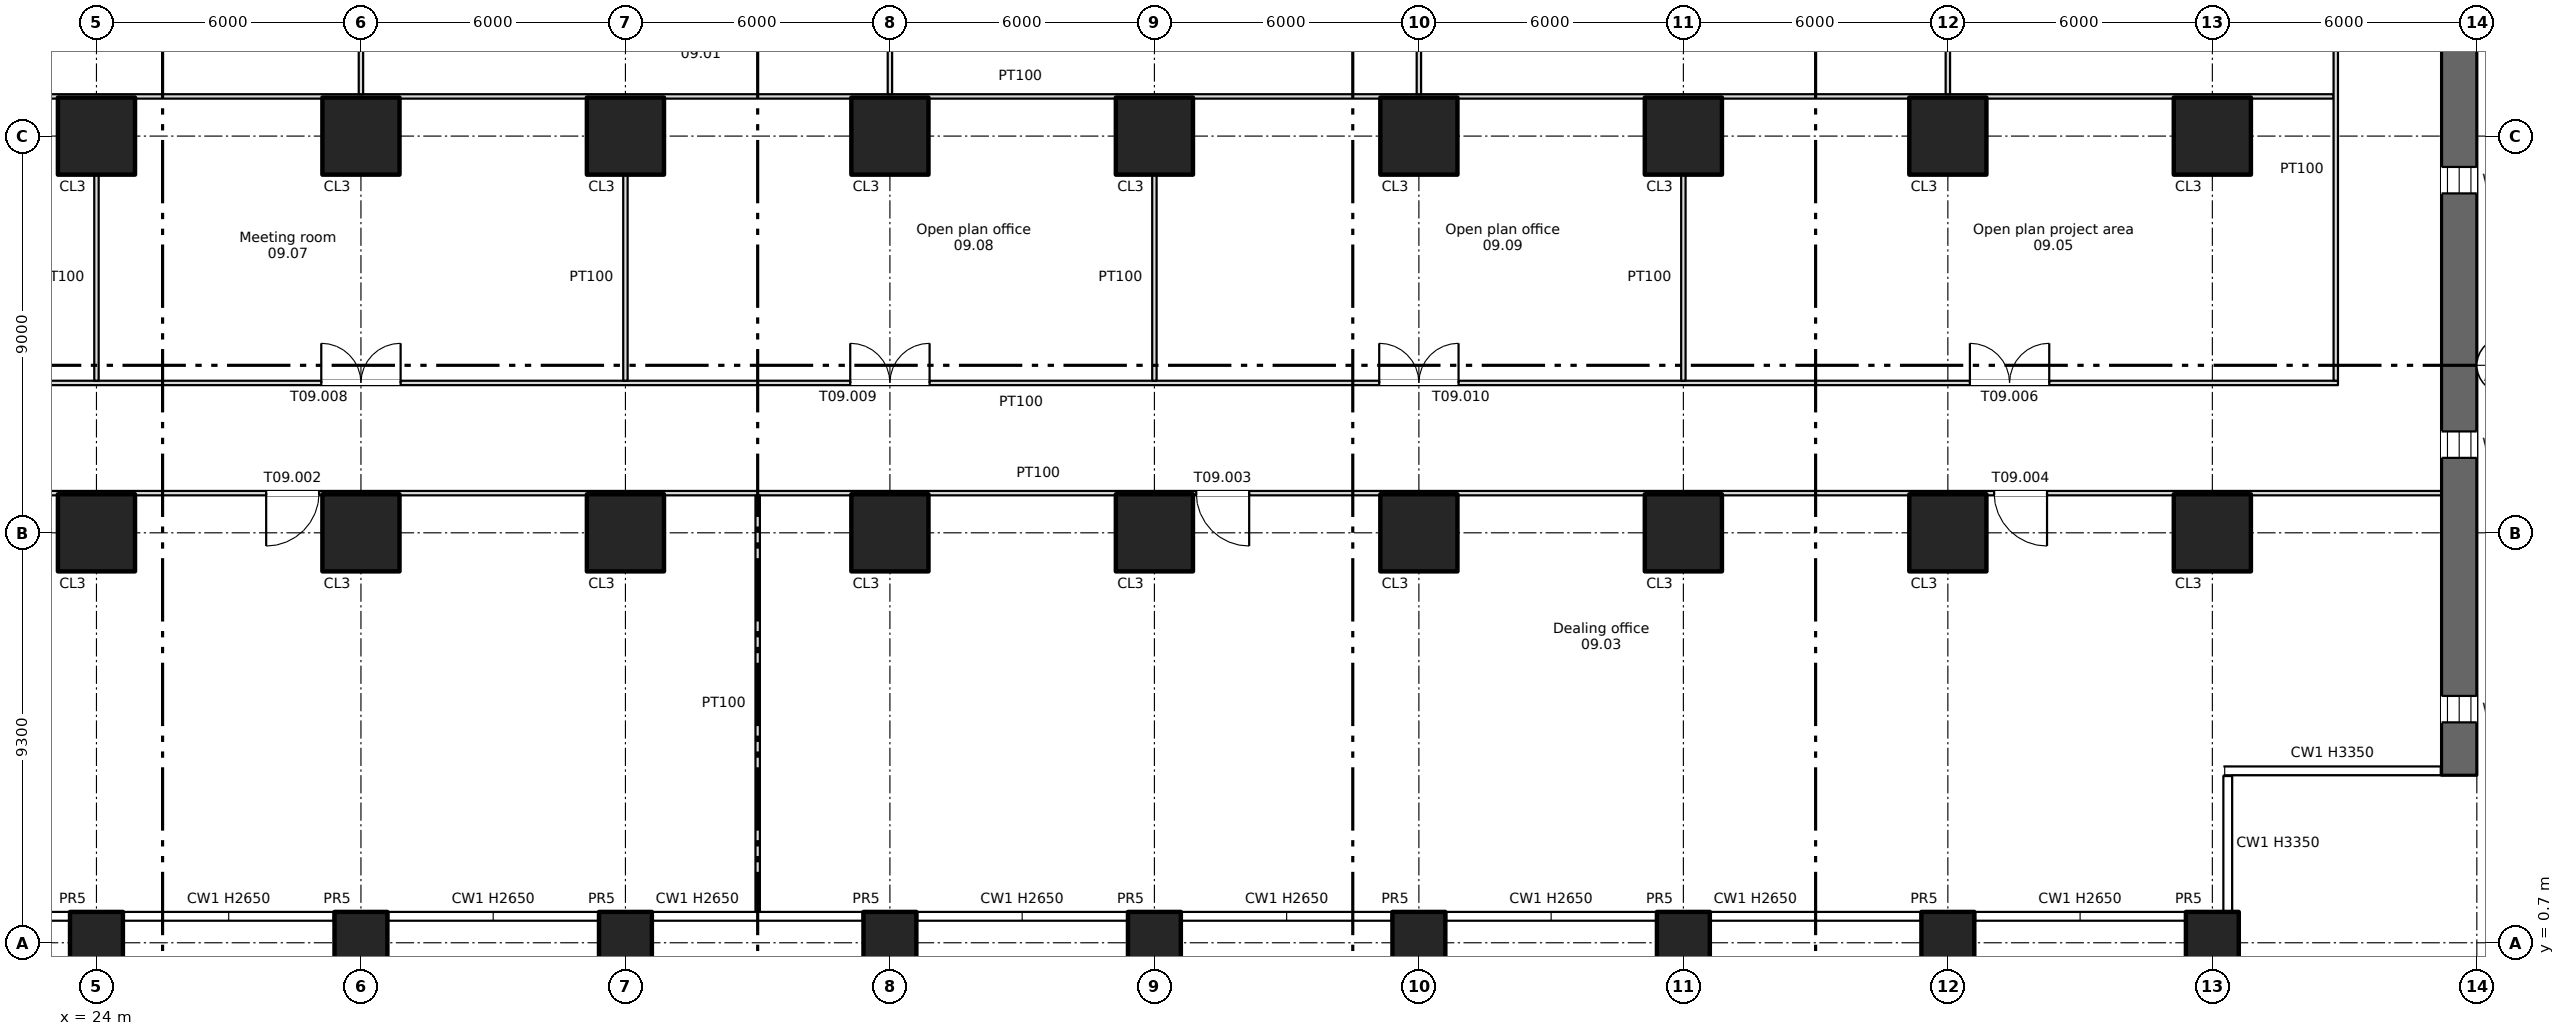
"""IFC4 building model, lengths in metres.
Left out: names, types, materials, properties, quantities, classifications, styles, units other than length and angle.
Written with IfcOpenShell. Run it as: python <this file> out.ifc"""

import sys

from ifc_helpers import new_model, si_unit, direction, frame, frame_2d, origin, origin_2d, place, context, subcontext, project, spatial, rectangle, extrude, element, fill, save


model = new_model("IFC4")
c1 = context("Model", 3, precision=1e-05, world=origin(), true_north=direction((0.0, 1.0)))
c2 = subcontext(c1, "Body", "Model", "MODEL_VIEW")
j1 = project(units=[si_unit("LENGTHUNIT", "METRE"), si_unit("PLANEANGLEUNIT", "RADIAN")], contexts=[c1])
p1 = place(None, origin())
s1 = spatial("IfcSite", under=j1, at=p1, CompositionType="ELEMENT")
p2 = place(p1, origin())
s2 = spatial("IfcBuilding", under=s1, at=p2, CompositionType="ELEMENT")
p3 = place(p2, frame((0.0, 0.0, 37.5)))
s3 = spatial("IfcBuildingStorey", under=s2, at=p3, CompositionType="ELEMENT", Elevation=37.5)
for number, where, z_axis, x_axis in (
    (1, (24.0, 0.7, -0.4), (0.0, 0.0, 1.0), (1.0, 0.0, 0.0)),
    (2, (30.0, 0.7, -0.4), (0.0, 0.0, 1.0), (1.0, 0.0, 0.0)),
    (3, (36.0, 0.7, -0.4), (0.0, 0.0, 1.0), (1.0, 0.0, 0.0)),
    (4, (42.0, 0.7, -0.4), (0.0, 0.0, 1.0), (1.0, 0.0, 0.0)),
    (5, (48.0, 0.7, -0.4), (0.0, 0.0, 1.0), (1.0, 0.0, 0.0)),
    (6, (54.0, 0.7, -0.4), (0.0, 0.0, 1.0), (1.0, 0.0, 0.0)),
    (7, (60.0, 0.7, -0.4), (0.0, 0.0, 1.0), (1.0, 0.0, 0.0)),
    (8, (66.0, 0.7, -0.4), (0.0, 0.0, 1.0), (1.0, 0.0, 0.0)),
    (9, (72.0, 0.7, -0.4), (0.0, 0.0, 1.0), (1.0, 0.0, 0.0)),
):
    element("IfcColumn", number, at=place(p3, frame(where, z_axis=z_axis, x_axis=x_axis)), inside=s3, PredefinedType="COLUMN", context=c2, shape_type="SweptSolid", body=[
        extrude(rectangle(XDim=1.2, YDim=1.4, at=origin_2d()), origin(), (0.0, 0.0, 1.0), 3.75),
    ])
for number, where, z_axis, x_axis in (
    (10, (24.0, 10.0, 0.0), (0.0, 0.0, 1.0), (1.0, 0.0, 0.0)),
    (11, (24.0, 19.0, 0.0), (0.0, 0.0, 1.0), (1.0, 0.0, 0.0)),
    (12, (30.0, 10.0, 0.0), (0.0, 0.0, 1.0), (1.0, 0.0, 0.0)),
    (13, (30.0, 19.0, 0.0), (0.0, 0.0, 1.0), (1.0, 0.0, 0.0)),
    (14, (36.0, 10.0, 0.0), (0.0, 0.0, 1.0), (1.0, 0.0, 0.0)),
    (15, (36.0, 19.0, 0.0), (0.0, 0.0, 1.0), (1.0, 0.0, 0.0)),
    (16, (42.0, 10.0, 0.0), (0.0, 0.0, 1.0), (1.0, 0.0, 0.0)),
    (17, (42.0, 19.0, 0.0), (0.0, 0.0, 1.0), (1.0, 0.0, 0.0)),
    (18, (48.0, 10.0, 0.0), (0.0, 0.0, 1.0), (1.0, 0.0, 0.0)),
    (19, (48.0, 19.0, 0.0), (0.0, 0.0, 1.0), (1.0, 0.0, 0.0)),
    (20, (54.0, 10.0, 0.0), (0.0, 0.0, 1.0), (1.0, 0.0, 0.0)),
    (21, (54.0, 19.0, 0.0), (0.0, 0.0, 1.0), (1.0, 0.0, 0.0)),
    (22, (60.0, 10.0, 0.0), (0.0, 0.0, 1.0), (1.0, 0.0, 0.0)),
    (23, (60.0, 19.0, 0.0), (0.0, 0.0, 1.0), (1.0, 0.0, 0.0)),
    (24, (66.0, 10.0, 0.0), (0.0, 0.0, 1.0), (1.0, 0.0, 0.0)),
    (25, (66.0, 19.0, 0.0), (0.0, 0.0, 1.0), (1.0, 0.0, 0.0)),
    (26, (72.0, 10.0, 0.0), (0.0, 0.0, 1.0), (1.0, 0.0, 0.0)),
    (27, (72.0, 19.0, 0.0), (0.0, 0.0, 1.0), (1.0, 0.0, 0.0)),
):
    element("IfcColumn", number, at=place(p3, frame(where, z_axis=z_axis, x_axis=x_axis)), inside=s3, PredefinedType="COLUMN", context=c2, shape_type="SweptSolid", body=[
        extrude(rectangle(XDim=1.75, YDim=1.75, at=origin_2d()), origin(), (0.0, 0.0, 1.0), 3.35),
    ])
p4 = place(p3, frame((77.6, 4.5, 0.0), z_axis=(0.0, 0.0, 1.0), x_axis=(0.0, 1.0, 0.0)))
e28 = element("IfcWall", 28, at=p4, inside=s3, PredefinedType="SHEAR", context=c2, shape_type="SweptSolid", body=[
    extrude(rectangle(XDim=37.0, YDim=0.8, at=frame_2d((18.5, 0.0))), origin(), (0.0, 0.0, 1.0), 3.35),
])
p5 = place(p4, frame((1.2, 0.0, 0.6)))
e29 = element("IfcOpeningElement", 29, at=p5, cuts=e28, PredefinedType="OPENING", context=c2, shape_type="SweptSolid", body=[
    extrude(rectangle(XDim=0.6, YDim=2.4, at=frame_2d((0.3, 1.2))), frame((0.0, 0.41, 0.0), z_axis=(0.0, -1.0, 0.0), x_axis=(1.0, 0.0, 0.0)), (0.0, 0.0, 1.0), 0.82),
])
p6 = place(p4, frame((7.2, 0.0, 0.6)))
e30 = element("IfcOpeningElement", 30, at=p6, cuts=e28, PredefinedType="OPENING", context=c2, shape_type="SweptSolid", body=[
    extrude(rectangle(XDim=0.6, YDim=2.4, at=frame_2d((0.3, 1.2))), frame((0.0, 0.41, 0.0), z_axis=(0.0, -1.0, 0.0), x_axis=(1.0, 0.0, 0.0)), (0.0, 0.0, 1.0), 0.82),
])
p7 = place(p4, frame((13.2, 0.0, 0.6)))
e31 = element("IfcOpeningElement", 31, at=p7, cuts=e28, PredefinedType="OPENING", context=c2, shape_type="SweptSolid", body=[
    extrude(rectangle(XDim=0.6, YDim=2.4, at=frame_2d((0.3, 1.2))), frame((0.0, 0.41, 0.0), z_axis=(0.0, -1.0, 0.0), x_axis=(1.0, 0.0, 0.0)), (0.0, 0.0, 1.0), 0.82),
])
p8 = place(p4, frame((19.2, 0.0, 0.6)))
e32 = element("IfcOpeningElement", 32, at=p8, cuts=e28, PredefinedType="OPENING", context=c2, shape_type="SweptSolid", body=[
    extrude(rectangle(XDim=0.6, YDim=2.4, at=frame_2d((0.3, 1.2))), frame((0.0, 0.41, 0.0), z_axis=(0.0, -1.0, 0.0), x_axis=(1.0, 0.0, 0.0)), (0.0, 0.0, 1.0), 0.82),
])
p9 = place(p4, frame((25.2, 0.0, 0.6)))
e33 = element("IfcOpeningElement", 33, at=p9, cuts=e28, PredefinedType="OPENING", context=c2, shape_type="SweptSolid", body=[
    extrude(rectangle(XDim=0.6, YDim=2.4, at=frame_2d((0.3, 1.2))), frame((0.0, 0.41, 0.0), z_axis=(0.0, -1.0, 0.0), x_axis=(1.0, 0.0, 0.0)), (0.0, 0.0, 1.0), 0.82),
])
p10 = place(p4, frame((31.2, 0.0, 0.6)))
e34 = element("IfcOpeningElement", 34, at=p10, cuts=e28, PredefinedType="OPENING", context=c2, shape_type="SweptSolid", body=[
    extrude(rectangle(XDim=0.6, YDim=2.4, at=frame_2d((0.3, 1.2))), frame((0.0, 0.41, 0.0), z_axis=(0.0, -1.0, 0.0), x_axis=(1.0, 0.0, 0.0)), (0.0, 0.0, 1.0), 0.82),
])
p11 = place(p3, frame((0.8, 10.9, 0.0), z_axis=(0.0, 0.0, 1.0), x_axis=(1.0, 0.0, 0.0)))
e35 = element("IfcWall", 35, at=p11, inside=s3, PredefinedType="PARTITIONING", context=c2, shape_type="SweptSolid", body=[
    extrude(rectangle(XDim=76.4, YDim=0.1, at=frame_2d((38.2, 0.0))), origin(), (0.0, 0.0, 1.0), 3.35),
])
p12 = place(p11, frame((8.95, 0.0, 0.0)))
e36 = element("IfcOpeningElement", 36, at=p12, cuts=e35, PredefinedType="OPENING", context=c2, shape_type="SweptSolid", body=[
    extrude(rectangle(XDim=1.2, YDim=2.1, at=frame_2d((0.6, 1.05))), frame((0.0, 0.06, 0.0), z_axis=(0.0, -1.0, 0.0), x_axis=(1.0, 0.0, 0.0)), (0.0, 0.0, 1.0), 0.12),
])
p13 = place(p11, frame((27.05, 0.0, 0.0)))
e37 = element("IfcOpeningElement", 37, at=p13, cuts=e35, PredefinedType="OPENING", context=c2, shape_type="SweptSolid", body=[
    extrude(rectangle(XDim=1.2, YDim=2.1, at=frame_2d((0.6, 1.05))), frame((0.0, 0.06, 0.0), z_axis=(0.0, -1.0, 0.0), x_axis=(1.0, 0.0, 0.0)), (0.0, 0.0, 1.0), 0.12),
])
p14 = place(p11, frame((48.15, 0.0, 0.0)))
e38 = element("IfcOpeningElement", 38, at=p14, cuts=e35, PredefinedType="OPENING", context=c2, shape_type="SweptSolid", body=[
    extrude(rectangle(XDim=1.2, YDim=2.1, at=frame_2d((0.6, 1.05))), frame((0.0, 0.06, 0.0), z_axis=(0.0, -1.0, 0.0), x_axis=(1.0, 0.0, 0.0)), (0.0, 0.0, 1.0), 0.12),
])
p15 = place(p11, frame((66.25, 0.0, 0.0)))
e39 = element("IfcOpeningElement", 39, at=p15, cuts=e35, PredefinedType="OPENING", context=c2, shape_type="SweptSolid", body=[
    extrude(rectangle(XDim=1.2, YDim=2.1, at=frame_2d((0.6, 1.05))), frame((0.0, 0.06, 0.0), z_axis=(0.0, -1.0, 0.0), x_axis=(1.0, 0.0, 0.0)), (0.0, 0.0, 1.0), 0.12),
])
p16 = place(p3, frame((3.15, 13.4, 0.0), z_axis=(0.0, 0.0, 1.0), x_axis=(1.0, 0.0, 0.0)))
e40 = element("IfcWall", 40, at=p16, inside=s3, PredefinedType="PARTITIONING", context=c2, shape_type="SweptSolid", body=[
    extrude(rectangle(XDim=71.7, YDim=0.1, at=frame_2d((35.85, 0.0))), origin(), (0.0, 0.0, 1.0), 3.35),
])
p17 = place(p16, frame((3.95, 0.0, 0.0)))
e41 = element("IfcOpeningElement", 41, at=p17, cuts=e40, PredefinedType="OPENING", context=c2, shape_type="SweptSolid", body=[
    extrude(rectangle(XDim=1.0, YDim=2.1, at=frame_2d((0.5, 1.05))), frame((0.0, 0.06, 0.0), z_axis=(0.0, -1.0, 0.0), x_axis=(1.0, 0.0, 0.0)), (0.0, 0.0, 1.0), 0.12),
])
p18 = place(p16, frame((63.35, 0.0, 0.0)))
e42 = element("IfcOpeningElement", 42, at=p18, cuts=e40, PredefinedType="OPENING", context=c2, shape_type="SweptSolid", body=[
    extrude(rectangle(XDim=1.8, YDim=2.1, at=frame_2d((0.9, 1.05))), frame((0.0, 0.06, 0.0), z_axis=(0.0, -1.0, 0.0), x_axis=(1.0, 0.0, 0.0)), (0.0, 0.0, 1.0), 0.12),
])
p19 = place(p16, frame((13.95, 0.0, 0.0)))
e43 = element("IfcOpeningElement", 43, at=p19, cuts=e40, PredefinedType="OPENING", context=c2, shape_type="SweptSolid", body=[
    extrude(rectangle(XDim=1.8, YDim=2.1, at=frame_2d((0.9, 1.05))), frame((0.0, 0.06, 0.0), z_axis=(0.0, -1.0, 0.0), x_axis=(1.0, 0.0, 0.0)), (0.0, 0.0, 1.0), 0.12),
])
p20 = place(p16, frame((25.95, 0.0, 0.0)))
e44 = element("IfcOpeningElement", 44, at=p20, cuts=e40, PredefinedType="OPENING", context=c2, shape_type="SweptSolid", body=[
    extrude(rectangle(XDim=1.8, YDim=2.1, at=frame_2d((0.9, 1.05))), frame((0.0, 0.06, 0.0), z_axis=(0.0, -1.0, 0.0), x_axis=(1.0, 0.0, 0.0)), (0.0, 0.0, 1.0), 0.12),
])
p21 = place(p16, frame((37.95, 0.0, 0.0)))
e45 = element("IfcOpeningElement", 45, at=p21, cuts=e40, PredefinedType="OPENING", context=c2, shape_type="SweptSolid", body=[
    extrude(rectangle(XDim=1.8, YDim=2.1, at=frame_2d((0.9, 1.05))), frame((0.0, 0.06, 0.0), z_axis=(0.0, -1.0, 0.0), x_axis=(1.0, 0.0, 0.0)), (0.0, 0.0, 1.0), 0.12),
])
p22 = place(p16, frame((49.95, 0.0, 0.0)))
e46 = element("IfcOpeningElement", 46, at=p22, cuts=e40, PredefinedType="OPENING", context=c2, shape_type="SweptSolid", body=[
    extrude(rectangle(XDim=1.8, YDim=2.1, at=frame_2d((0.9, 1.05))), frame((0.0, 0.06, 0.0), z_axis=(0.0, -1.0, 0.0), x_axis=(1.0, 0.0, 0.0)), (0.0, 0.0, 1.0), 0.12),
])
p23 = place(p3, frame((3.25, 19.9, 0.0), z_axis=(0.0, 0.0, 1.0), x_axis=(1.0, 0.0, 0.0)))
e47 = element("IfcWall", 47, at=p23, inside=s3, PredefinedType="PARTITIONING", context=c2, shape_type="SweptSolid", body=[
    extrude(rectangle(XDim=71.5, YDim=0.1, at=frame_2d((35.75, 0.0))), origin(), (0.0, 0.0, 1.0), 3.35),
])
p24 = place(p3, frame((24.0, 13.45, 0.0), z_axis=(0.0, 0.0, 1.0), x_axis=(0.0, 1.0, 0.0)))
e48 = element("IfcWall", 48, at=p24, inside=s3, PredefinedType="PARTITIONING", context=c2, shape_type="SweptSolid", body=[
    extrude(rectangle(XDim=4.675, YDim=0.1, at=frame_2d((2.337, 0.0))), origin(), (0.0, 0.0, 1.0), 3.35),
])
p25 = place(p3, frame((30.0, 19.95, 0.0), z_axis=(0.0, 0.0, 1.0), x_axis=(0.0, 1.0, 0.0)))
e49 = element("IfcWall", 49, at=p25, inside=s3, PredefinedType="PARTITIONING", context=c2, shape_type="SweptSolid", body=[
    extrude(rectangle(XDim=5.0, YDim=0.1, at=frame_2d((2.5, 0.0))), origin(), (0.0, 0.0, 1.0), 3.35),
])
p26 = place(p3, frame((36.0, 13.45, 0.0), z_axis=(0.0, 0.0, 1.0), x_axis=(0.0, 1.0, 0.0)))
e50 = element("IfcWall", 50, at=p26, inside=s3, PredefinedType="PARTITIONING", context=c2, shape_type="SweptSolid", body=[
    extrude(rectangle(XDim=4.675, YDim=0.1, at=frame_2d((2.337, 0.0))), origin(), (0.0, 0.0, 1.0), 3.35),
])
p27 = place(p3, frame((39.0, 1.4, 0.0), z_axis=(0.0, 0.0, 1.0), x_axis=(0.0, 1.0, 0.0)))
e51 = element("IfcWall", 51, at=p27, inside=s3, PredefinedType="PARTITIONING", context=c2, shape_type="SweptSolid", body=[
    extrude(rectangle(XDim=9.45, YDim=0.1, at=frame_2d((4.725, 0.0))), origin(), (0.0, 0.0, 1.0), 3.35),
])
p28 = place(p3, frame((42.0, 19.95, 0.0), z_axis=(0.0, 0.0, 1.0), x_axis=(0.0, 1.0, 0.0)))
e52 = element("IfcWall", 52, at=p28, inside=s3, PredefinedType="PARTITIONING", context=c2, shape_type="SweptSolid", body=[
    extrude(rectangle(XDim=5.0, YDim=0.1, at=frame_2d((2.5, 0.0))), origin(), (0.0, 0.0, 1.0), 3.35),
])
p29 = place(p3, frame((48.0, 13.45, 0.0), z_axis=(0.0, 0.0, 1.0), x_axis=(0.0, 1.0, 0.0)))
e53 = element("IfcWall", 53, at=p29, inside=s3, PredefinedType="PARTITIONING", context=c2, shape_type="SweptSolid", body=[
    extrude(rectangle(XDim=4.675, YDim=0.1, at=frame_2d((2.337, 0.0))), origin(), (0.0, 0.0, 1.0), 3.35),
])
p30 = place(p3, frame((54.0, 19.95, 0.0), z_axis=(0.0, 0.0, 1.0), x_axis=(0.0, 1.0, 0.0)))
e54 = element("IfcWall", 54, at=p30, inside=s3, PredefinedType="PARTITIONING", context=c2, shape_type="SweptSolid", body=[
    extrude(rectangle(XDim=5.0, YDim=0.1, at=frame_2d((2.5, 0.0))), origin(), (0.0, 0.0, 1.0), 3.35),
])
p31 = place(p3, frame((60.0, 13.45, 0.0), z_axis=(0.0, 0.0, 1.0), x_axis=(0.0, 1.0, 0.0)))
e55 = element("IfcWall", 55, at=p31, inside=s3, PredefinedType="PARTITIONING", context=c2, shape_type="SweptSolid", body=[
    extrude(rectangle(XDim=4.675, YDim=0.1, at=frame_2d((2.337, 0.0))), origin(), (0.0, 0.0, 1.0), 3.35),
])
p32 = place(p3, frame((66.0, 19.95, 0.0), z_axis=(0.0, 0.0, 1.0), x_axis=(0.0, 1.0, 0.0)))
e56 = element("IfcWall", 56, at=p32, inside=s3, PredefinedType="PARTITIONING", context=c2, shape_type="SweptSolid", body=[
    extrude(rectangle(XDim=5.0, YDim=0.1, at=frame_2d((2.5, 0.0))), origin(), (0.0, 0.0, 1.0), 3.35),
])
p33 = place(p3, frame((74.8, 13.45, 0.0), z_axis=(0.0, 0.0, 1.0), x_axis=(0.0, 1.0, 0.0)))
e57 = element("IfcWall", 57, at=p33, inside=s3, PredefinedType="PARTITIONING", context=c2, shape_type="SweptSolid", body=[
    extrude(rectangle(XDim=11.5, YDim=0.1, at=frame_2d((5.75, 0.0))), origin(), (0.0, 0.0, 1.0), 3.35),
])
p34 = place(p5, origin())
e58 = element("IfcWindow", 58, at=p34, inside=s3, PartitioningType="SINGLE_PANEL", PredefinedType="WINDOW", context=c2, shape_type="SweptSolid", body=[
    extrude(rectangle(XDim=0.6, YDim=2.4, at=frame_2d((0.3, 1.2))), frame((0.0, 0.03, 0.0), z_axis=(0.0, -1.0, 0.0), x_axis=(1.0, 0.0, 0.0)), (0.0, 0.0, 1.0), 0.06),
])
fill(e29, e58)
p35 = place(p6, origin())
e59 = element("IfcWindow", 59, at=p35, inside=s3, PartitioningType="SINGLE_PANEL", PredefinedType="WINDOW", context=c2, shape_type="SweptSolid", body=[
    extrude(rectangle(XDim=0.6, YDim=2.4, at=frame_2d((0.3, 1.2))), frame((0.0, 0.03, 0.0), z_axis=(0.0, -1.0, 0.0), x_axis=(1.0, 0.0, 0.0)), (0.0, 0.0, 1.0), 0.06),
])
fill(e30, e59)
p36 = place(p7, origin())
e60 = element("IfcWindow", 60, at=p36, inside=s3, PartitioningType="SINGLE_PANEL", PredefinedType="WINDOW", context=c2, shape_type="SweptSolid", body=[
    extrude(rectangle(XDim=0.6, YDim=2.4, at=frame_2d((0.3, 1.2))), frame((0.0, 0.03, 0.0), z_axis=(0.0, -1.0, 0.0), x_axis=(1.0, 0.0, 0.0)), (0.0, 0.0, 1.0), 0.06),
])
fill(e31, e60)
p37 = place(p13, origin())
e61 = element("IfcDoor", 61, at=p37, inside=s3, OperationType="SINGLE_SWING_LEFT", PredefinedType="DOOR", context=c2, shape_type="SweptSolid", body=[
    extrude(rectangle(XDim=1.2, YDim=2.1, at=frame_2d((0.6, 1.05))), frame((0.0, 0.025, 0.0), z_axis=(0.0, -1.0, 0.0), x_axis=(1.0, 0.0, 0.0)), (0.0, 0.0, 1.0), 0.05),
])
fill(e37, e61)
p38 = place(p14, origin())
e62 = element("IfcDoor", 62, at=p38, inside=s3, OperationType="SINGLE_SWING_RIGHT", PredefinedType="DOOR", context=c2, shape_type="SweptSolid", body=[
    extrude(rectangle(XDim=1.2, YDim=2.1, at=frame_2d((0.6, 1.05))), frame((0.0, 0.025, 0.0), z_axis=(0.0, -1.0, 0.0), x_axis=(1.0, 0.0, 0.0)), (0.0, 0.0, 1.0), 0.05),
])
fill(e38, e62)
p39 = place(p15, origin())
e63 = element("IfcDoor", 63, at=p39, inside=s3, OperationType="SINGLE_SWING_RIGHT", PredefinedType="DOOR", context=c2, shape_type="SweptSolid", body=[
    extrude(rectangle(XDim=1.2, YDim=2.1, at=frame_2d((0.6, 1.05))), frame((0.0, 0.025, 0.0), z_axis=(0.0, -1.0, 0.0), x_axis=(1.0, 0.0, 0.0)), (0.0, 0.0, 1.0), 0.05),
])
fill(e39, e63)
p40 = place(p18, origin())
e64 = element("IfcDoor", 64, at=p40, inside=s3, OperationType="DOUBLE_DOOR_SINGLE_SWING", PredefinedType="DOOR", context=c2, shape_type="SweptSolid", body=[
    extrude(rectangle(XDim=1.8, YDim=2.1, at=frame_2d((0.9, 1.05))), frame((0.0, 0.025, 0.0), z_axis=(0.0, -1.0, 0.0), x_axis=(1.0, 0.0, 0.0)), (0.0, 0.0, 1.0), 0.05),
])
fill(e42, e64)
p41 = place(p20, origin())
e65 = element("IfcDoor", 65, at=p41, inside=s3, OperationType="DOUBLE_DOOR_SINGLE_SWING", PredefinedType="DOOR", context=c2, shape_type="SweptSolid", body=[
    extrude(rectangle(XDim=1.8, YDim=2.1, at=frame_2d((0.9, 1.05))), frame((0.0, 0.025, 0.0), z_axis=(0.0, -1.0, 0.0), x_axis=(1.0, 0.0, 0.0)), (0.0, 0.0, 1.0), 0.05),
])
fill(e44, e65)
p42 = place(p21, origin())
e66 = element("IfcDoor", 66, at=p42, inside=s3, OperationType="DOUBLE_DOOR_SINGLE_SWING", PredefinedType="DOOR", context=c2, shape_type="SweptSolid", body=[
    extrude(rectangle(XDim=1.8, YDim=2.1, at=frame_2d((0.9, 1.05))), frame((0.0, 0.025, 0.0), z_axis=(0.0, -1.0, 0.0), x_axis=(1.0, 0.0, 0.0)), (0.0, 0.0, 1.0), 0.05),
])
fill(e45, e66)
p43 = place(p22, origin())
e67 = element("IfcDoor", 67, at=p43, inside=s3, OperationType="DOUBLE_DOOR_SINGLE_SWING", PredefinedType="DOOR", context=c2, shape_type="SweptSolid", body=[
    extrude(rectangle(XDim=1.8, YDim=2.1, at=frame_2d((0.9, 1.05))), frame((0.0, 0.025, 0.0), z_axis=(0.0, -1.0, 0.0), x_axis=(1.0, 0.0, 0.0)), (0.0, 0.0, 1.0), 0.05),
])
fill(e46, e67)
save(model, sys.argv[1])
